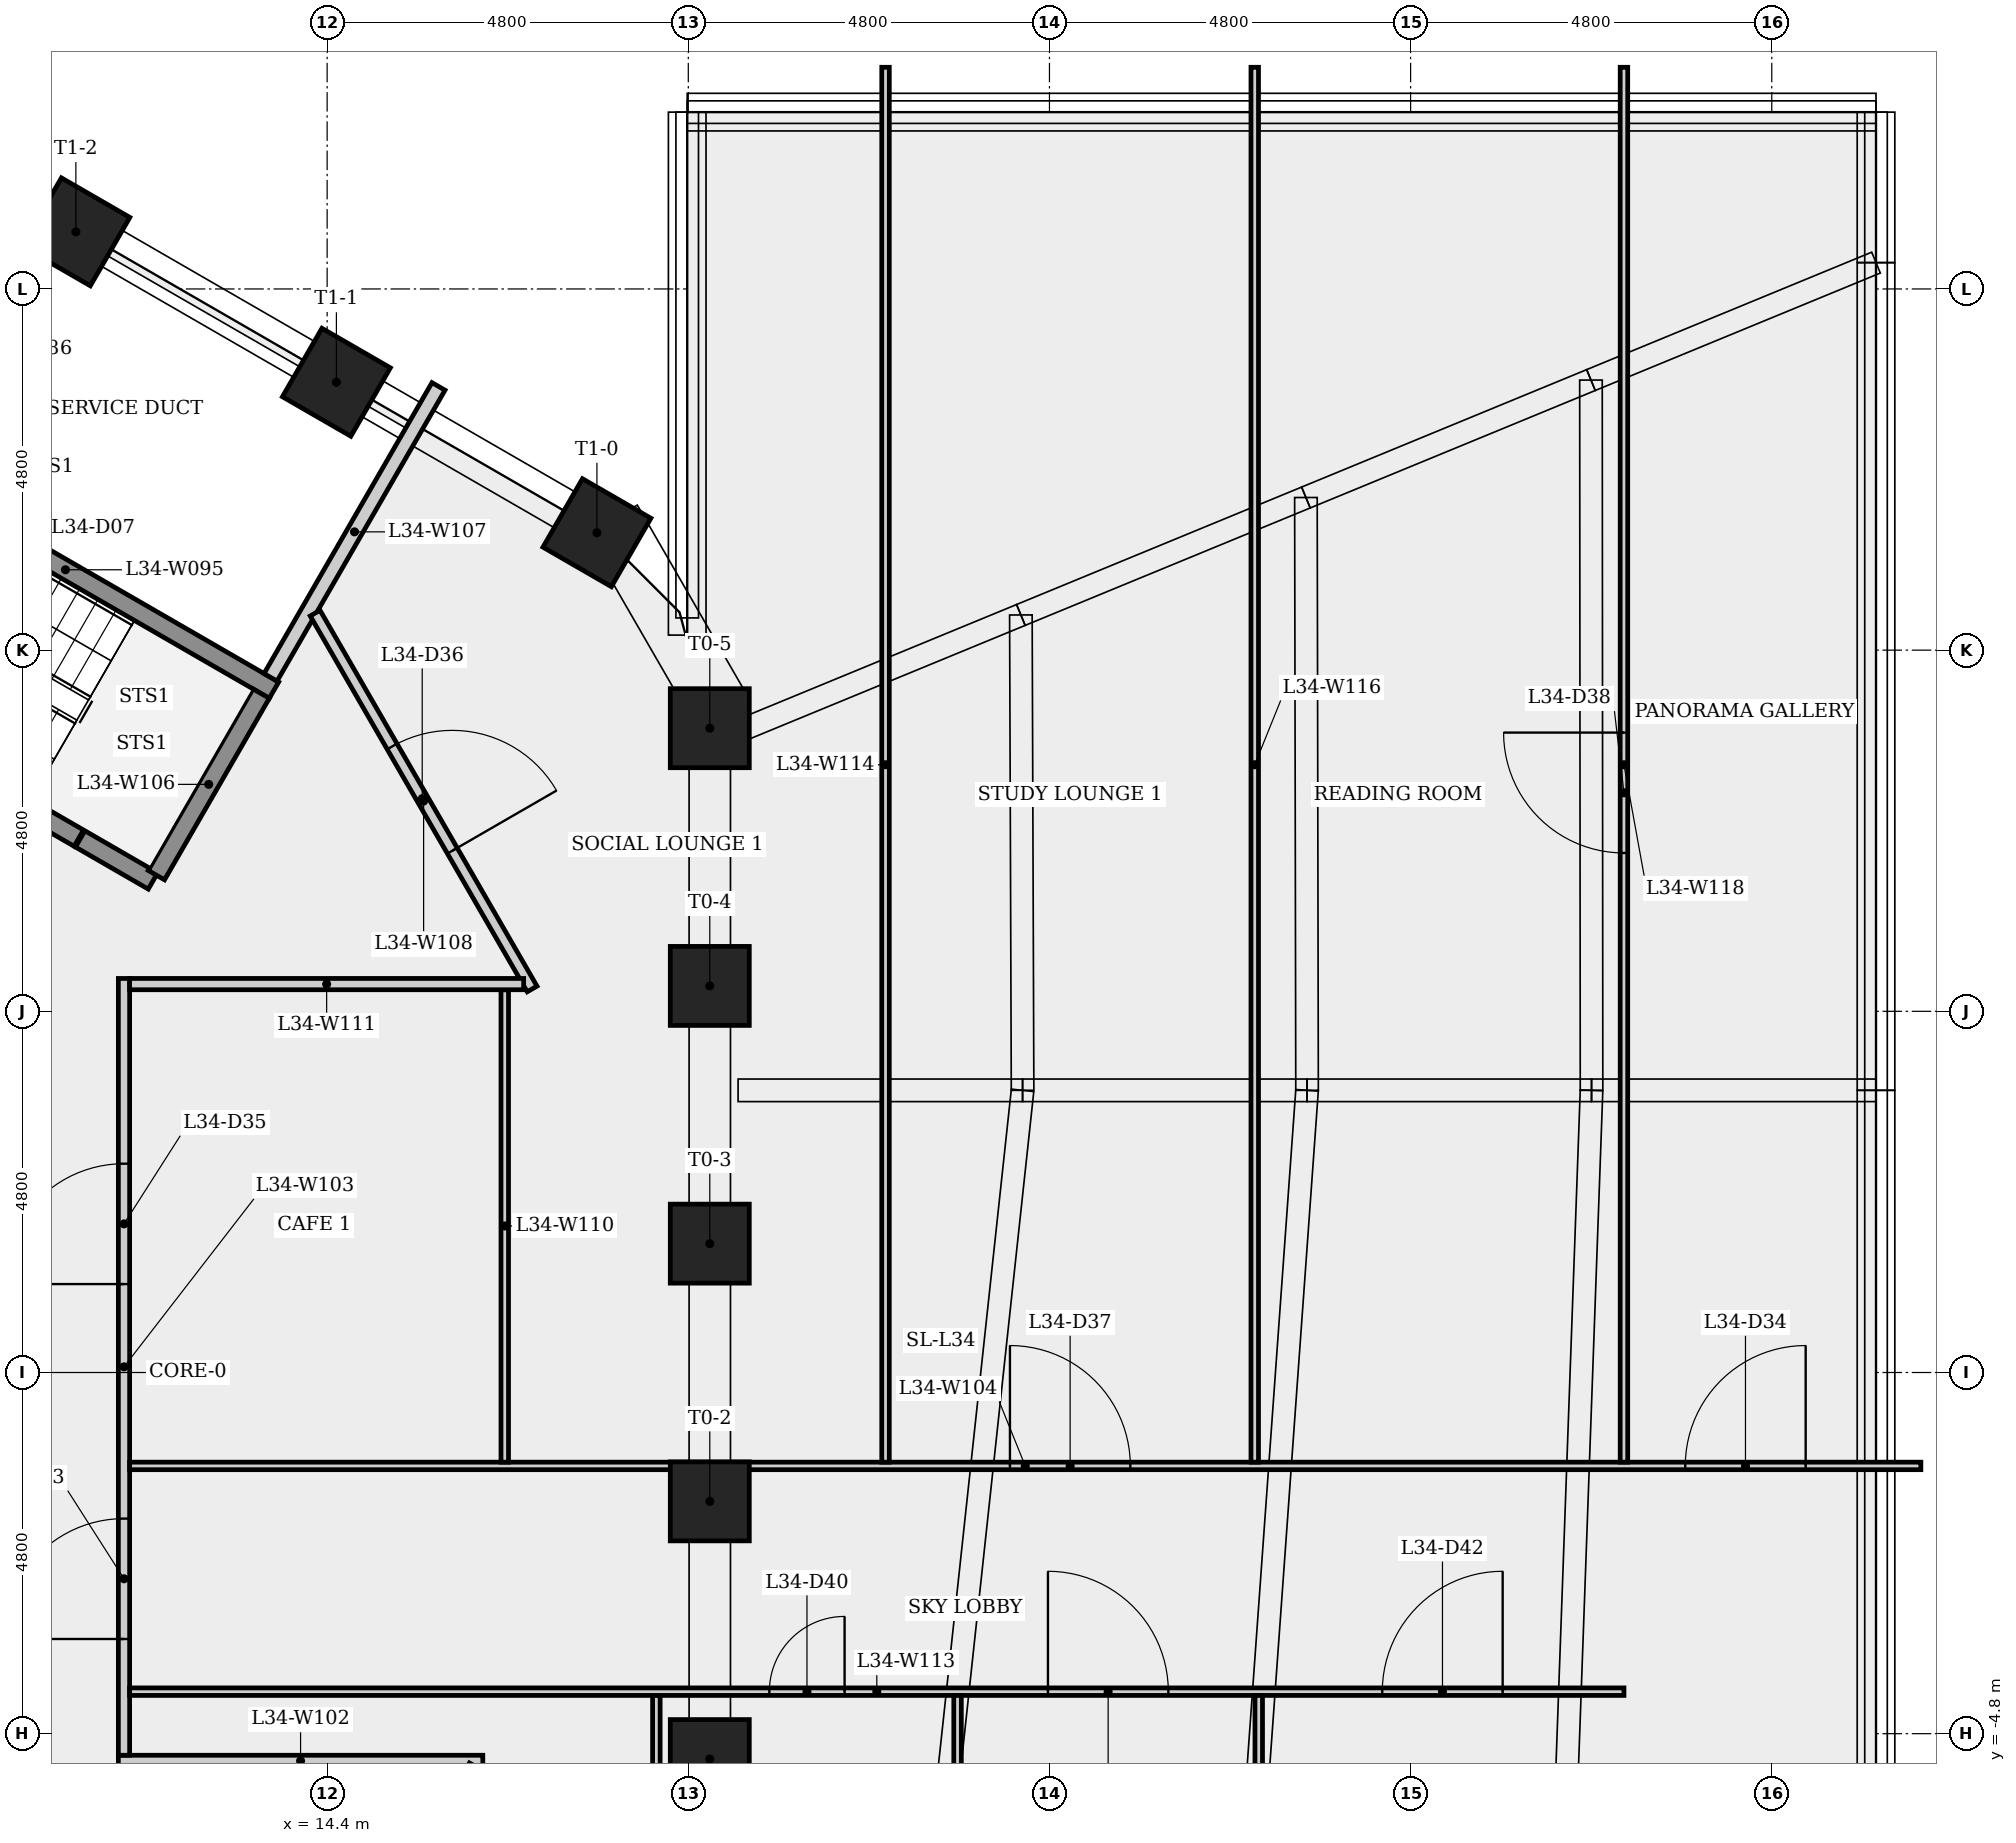
"""IFC4 building model, lengths in metres.
Left out: names, types, materials, properties, quantities, classifications, styles, units other than length and angle.
Written with IfcOpenShell. Run it as: python <this file> out.ifc"""

import sys

from ifc_helpers import new_model, si_unit, direction, frame, frame_2d, origin, origin_2d, place, context, subcontext, project, spatial, rectangle, extrude, element, fill, save


model = new_model("IFC4")
c1 = context("Model", 3, precision=1e-05, world=origin(), true_north=direction((0.0, 1.0)))
c2 = subcontext(c1, "Body", "Model", "MODEL_VIEW")
j1 = project(units=[si_unit("LENGTHUNIT", "METRE"), si_unit("PLANEANGLEUNIT", "RADIAN")], contexts=[c1])
p1 = place(None, origin())
s1 = spatial("IfcSite", under=j1, at=p1, CompositionType="ELEMENT")
p2 = place(p1, origin())
s2 = spatial("IfcBuilding", under=s1, at=p2, CompositionType="ELEMENT")
p3 = place(p2, frame((0.0, 0.0, 128.5)))
s3 = spatial("IfcBuildingStorey", under=s2, at=p3, CompositionType="ELEMENT", Elevation=128.5)
for number, where, z_axis, x_axis in (
    (1, (19.486, -5.137, 0.0), (0.0, 0.0, 1.0), (1.0, 0.0, 0.0)),
    (2, (19.486, -1.712, 0.0), (0.0, 0.0, 1.0), (1.0, 0.0, 0.0)),
    (3, (19.486, 1.712, 0.0), (0.0, 0.0, 1.0), (1.0, 0.0, 0.0)),
    (4, (19.486, 5.137, 0.0), (0.0, 0.0, 1.0), (1.0, 0.0, 0.0)),
    (5, (19.486, 8.562, 0.0), (0.0, 0.0, 1.0), (1.0, 0.0, 0.0)),
    (6, (17.986, 11.161, 0.0), (0.0, 0.0, 1.0), (0.5, 0.866, 0.0)),
    (7, (14.523, 13.16, 0.0), (0.0, 0.0, 1.0), (0.5, 0.866, 0.0)),
    (8, (11.06, 15.159, 0.0), (0.0, 0.0, 1.0), (0.5, 0.866, 0.0)),
):
    element("IfcColumn", number, at=place(p3, frame(where, z_axis=z_axis, x_axis=x_axis)), inside=s3, PredefinedType="COLUMN", context=c2, shape_type="SweptSolid", body=[
        extrude(rectangle(XDim=1.05, YDim=1.05, at=origin_2d()), origin(), (0.0, 0.0, 1.0), 4.0),
    ])
p4 = place(p3, frame((8.151, 12.268, 0.0), z_axis=(0.0, 0.0, 1.0), x_axis=(0.866025499775, -0.499999833739, 0.0)))
e9 = element("IfcWall", 9, at=p4, inside=s3, PredefinedType="SHEAR", context=c2, shape_type="SweptSolid", body=[
    extrude(rectangle(XDim=6.4, YDim=0.25, at=frame_2d((3.2, 0.0))), origin(), (0.0, 0.0, 1.0), 3.65),
])
p5 = place(p3, frame((11.1, 7.101, 0.0), z_axis=(0.0, 0.0, 1.0), x_axis=(-0.8660265141, 0.499998076872, 0.0)))
e10 = element("IfcWall", 10, at=p5, inside=s3, PredefinedType="SHEAR", context=c2, shape_type="SweptSolid", body=[
    extrude(rectangle(XDim=5.137, YDim=0.25, at=frame_2d((2.569, 0.0))), origin(), (0.0, 0.0, 1.0), 3.65),
])
p6 = place(p5, frame((3.987, 0.0, 0.0)))
e11 = element("IfcOpeningElement", 11, at=p6, cuts=e10, PredefinedType="OPENING", context=c2, shape_type="SweptSolid", body=[
    extrude(rectangle(XDim=1.0, YDim=2.1, at=frame_2d((0.5, 1.05))), frame((0.0, 0.135, 0.0), z_axis=(0.0, -1.0, 0.0), x_axis=(1.0, 0.0, 0.0)), (0.0, 0.0, 1.0), 0.27),
])
p7 = place(p3, frame((11.625, -5.162, 0.0), z_axis=(0.0, 0.0, 1.0), x_axis=(1.0, 0.0, 0.0)))
e12 = element("IfcWall", 12, at=p7, inside=s3, PredefinedType="PARTITIONING", context=c2, shape_type="SweptSolid", body=[
    extrude(rectangle(XDim=4.844, YDim=0.15, at=frame_2d((2.422, 0.0))), origin(), (0.0, 0.0, 1.0), 3.65),
])
p8 = place(p3, frame((11.7, -5.087, 0.0), z_axis=(0.0, 0.0, 1.0), x_axis=(0.0, 1.0, 0.0)))
e13 = element("IfcWall", 13, at=p8, inside=s3, PredefinedType="PARTITIONING", context=c2, shape_type="SweptSolid", body=[
    extrude(rectangle(XDim=10.323, YDim=0.15, at=frame_2d((5.162, 0.0))), origin(), (0.0, 0.0, 1.0), 3.65),
])
p9 = place(p8, frame((1.545, 0.0, 0.0)))
e14 = element("IfcOpeningElement", 14, at=p9, cuts=e13, PredefinedType="OPENING", context=c2, shape_type="SweptSolid", body=[
    extrude(rectangle(XDim=1.6, YDim=2.1, at=frame_2d((0.8, 1.05))), frame((0.0, 0.085, 0.0), z_axis=(0.0, -1.0, 0.0), x_axis=(1.0, 0.0, 0.0)), (0.0, 0.0, 1.0), 0.17),
])
p10 = place(p8, frame((6.262, 0.0, 0.0)))
e15 = element("IfcOpeningElement", 15, at=p10, cuts=e13, PredefinedType="OPENING", context=c2, shape_type="SweptSolid", body=[
    extrude(rectangle(XDim=1.6, YDim=2.1, at=frame_2d((0.8, 1.05))), frame((0.0, 0.085, 0.0), z_axis=(0.0, -1.0, 0.0), x_axis=(1.0, 0.0, 0.0)), (0.0, 0.0, 1.0), 0.17),
])
p11 = place(p3, frame((11.775, -1.242, 0.0), z_axis=(0.0, 0.0, 1.0), x_axis=(1.0, 0.0, 0.0)))
e16 = element("IfcWall", 16, at=p11, inside=s3, PredefinedType="PARTITIONING", context=c2, shape_type="SweptSolid", body=[
    extrude(rectangle(XDim=23.807, YDim=0.1, at=frame_2d((11.903, 0.0))), origin(), (0.0, 0.0, 1.0), 3.65),
])
p12 = place(p11, frame((20.676, 0.0, 0.0)))
e17 = element("IfcOpeningElement", 17, at=p12, cuts=e16, PredefinedType="OPENING", context=c2, shape_type="SweptSolid", body=[
    extrude(rectangle(XDim=1.6, YDim=2.1, at=frame_2d((0.8, 1.05))), frame((0.0, 0.06, 0.0), z_axis=(0.0, -1.0, 0.0), x_axis=(1.0, 0.0, 0.0)), (0.0, 0.0, 1.0), 0.12),
])
p13 = place(p11, frame((11.7, 0.0, 0.0)))
e18 = element("IfcOpeningElement", 18, at=p13, cuts=e16, PredefinedType="OPENING", context=c2, shape_type="SweptSolid", body=[
    extrude(rectangle(XDim=1.6, YDim=2.1, at=frame_2d((0.8, 1.05))), frame((0.0, 0.06, 0.0), z_axis=(0.0, -1.0, 0.0), x_axis=(1.0, 0.0, 0.0)), (0.0, 0.0, 1.0), 0.12),
])
p14 = place(p3, frame((12.085, 6.532, 0.0), z_axis=(0.0, 0.0, 1.0), x_axis=(-0.86604373436, 0.499968249168, 0.0)))
e19 = element("IfcWall", 19, at=p14, inside=s3, PredefinedType="SHEAR", context=c2, shape_type="SweptSolid", body=[
    extrude(rectangle(XDim=1.118, YDim=0.25, at=frame_2d((0.559, 0.0))), origin(), (0.0, 0.0, 1.0), 3.65),
])
p15 = place(p3, frame((13.523, 9.022, 0.0), z_axis=(0.0, 0.0, 1.0), x_axis=(-0.500013277472, -0.866017737897, 0.0)))
e20 = element("IfcWall", 20, at=p15, inside=s3, PredefinedType="SHEAR", context=c2, shape_type="SweptSolid", body=[
    extrude(rectangle(XDim=2.786, YDim=0.25, at=frame_2d((1.393, 0.0))), origin(), (0.0, 0.0, 1.0), 3.65),
])
p16 = place(p3, frame((13.648, 9.239, 0.0), z_axis=(0.0, 0.0, 1.0), x_axis=(0.499962311098, 0.866047162388, 0.0)))
e21 = element("IfcWall", 21, at=p16, inside=s3, PredefinedType="PLUMBINGWALL", context=c2, shape_type="SweptSolid", body=[
    extrude(rectangle(XDim=4.464, YDim=0.2, at=frame_2d((2.232, 0.0))), origin(), (0.0, 0.0, 1.0), 3.65),
])
p17 = place(p3, frame((14.24, 10.092, 0.0), z_axis=(0.0, 0.0, 1.0), x_axis=(0.500013126474, -0.866017825079, 0.0)))
e22 = element("IfcWall", 22, at=p17, inside=s3, PredefinedType="PARTITIONING", context=c2, shape_type="SweptSolid", body=[
    extrude(rectangle(XDim=5.768, YDim=0.15, at=frame_2d((2.884, 0.0))), origin(), (0.0, 0.0, 1.0), 3.65),
])
p18 = place(p17, frame((2.046, 0.0, 0.0)))
e23 = element("IfcOpeningElement", 23, at=p18, cuts=e22, PredefinedType="OPENING", context=c2, shape_type="SweptSolid", body=[
    extrude(rectangle(XDim=1.6, YDim=2.1, at=frame_2d((0.8, 1.05))), frame((0.0, 0.085, 0.0), z_axis=(0.0, -1.0, 0.0), x_axis=(1.0, 0.0, 0.0)), (0.0, 0.0, 1.0), 0.17),
])
p19 = place(p3, frame((16.356, -5.227, 0.0), z_axis=(0.0, 0.0, 1.0), x_axis=(-0.500017200592, -0.86601547279, 0.0)))
e24 = element("IfcWall", 24, at=p19, inside=s3, PredefinedType="PARTITIONING", context=c2, shape_type="SweptSolid", body=[
    extrude(rectangle(XDim=8.389, YDim=0.15, at=frame_2d((4.194, 0.0))), origin(), (0.0, 0.0, 1.0), 3.65),
])
p20 = place(p19, frame((3.395, 0.0, 0.0)))
e25 = element("IfcOpeningElement", 25, at=p20, cuts=e24, PredefinedType="OPENING", context=c2, shape_type="SweptSolid", body=[
    extrude(rectangle(XDim=1.6, YDim=2.1, at=frame_2d((0.8, 1.05))), frame((0.0, 0.085, 0.0), z_axis=(0.0, -1.0, 0.0), x_axis=(1.0, 0.0, 0.0)), (0.0, 0.0, 1.0), 0.17),
])
p21 = place(p3, frame((16.76, 5.087, 0.0), z_axis=(0.0, 0.0, 1.0), x_axis=(0.0, -1.0, 0.0)))
e26 = element("IfcWall", 26, at=p21, inside=s3, PredefinedType="PARTITIONING", context=c2, shape_type="SweptSolid", body=[
    extrude(rectangle(XDim=6.278, YDim=0.1, at=frame_2d((3.139, 0.0))), origin(), (0.0, 0.0, 1.0), 3.65),
])
p22 = place(p3, frame((11.775, 5.162, 0.0), z_axis=(0.0, 0.0, 1.0), x_axis=(1.0, 0.0, 0.0)))
e27 = element("IfcWall", 27, at=p22, inside=s3, PredefinedType="PARTITIONING", context=c2, shape_type="SweptSolid", body=[
    extrude(rectangle(XDim=5.237, YDim=0.15, at=frame_2d((2.618, 0.0))), origin(), (0.0, 0.0, 1.0), 3.65),
])
p23 = place(p3, frame((18.776, -4.292, 0.0), z_axis=(0.0, 0.0, 1.0), x_axis=(0.0, -1.0, 0.0)))
e28 = element("IfcWall", 28, at=p23, inside=s3, PredefinedType="PARTITIONING", context=c2, shape_type="SweptSolid", body=[
    extrude(rectangle(XDim=5.907, YDim=0.1, at=frame_2d((2.954, 0.0))), origin(), (0.0, 0.0, 1.0), 3.65),
])
p24 = place(p3, frame((11.775, -4.242, 0.0), z_axis=(0.0, 0.0, 1.0), x_axis=(1.0, 0.0, 0.0)))
e29 = element("IfcWall", 29, at=p24, inside=s3, PredefinedType="PARTITIONING", context=c2, shape_type="SweptSolid", body=[
    extrude(rectangle(XDim=19.861, YDim=0.1, at=frame_2d((9.93, 0.0))), origin(), (0.0, 0.0, 1.0), 3.65),
])
p25 = place(p24, frame((8.502, 0.0, 0.0)))
e30 = element("IfcOpeningElement", 30, at=p25, cuts=e29, PredefinedType="OPENING", context=c2, shape_type="SweptSolid", body=[
    extrude(rectangle(XDim=1.0, YDim=2.1, at=frame_2d((0.5, 1.05))), frame((0.0, 0.06, 0.0), z_axis=(0.0, -1.0, 0.0), x_axis=(1.0, 0.0, 0.0)), (0.0, 0.0, 1.0), 0.12),
])
p26 = place(p24, frame((12.205, 0.0, 0.0)))
e31 = element("IfcOpeningElement", 31, at=p26, cuts=e29, PredefinedType="OPENING", context=c2, shape_type="SweptSolid", body=[
    extrude(rectangle(XDim=1.6, YDim=2.1, at=frame_2d((0.8, 1.05))), frame((0.0, 0.06, 0.0), z_axis=(0.0, -1.0, 0.0), x_axis=(1.0, 0.0, 0.0)), (0.0, 0.0, 1.0), 0.12),
])
p27 = place(p24, frame((16.648, 0.0, 0.0)))
e32 = element("IfcOpeningElement", 32, at=p27, cuts=e29, PredefinedType="OPENING", context=c2, shape_type="SweptSolid", body=[
    extrude(rectangle(XDim=1.6, YDim=2.1, at=frame_2d((0.8, 1.05))), frame((0.0, 0.06, 0.0), z_axis=(0.0, -1.0, 0.0), x_axis=(1.0, 0.0, 0.0)), (0.0, 0.0, 1.0), 0.12),
])
p28 = place(p3, frame((21.821, 17.346, 0.0), z_axis=(0.0, 0.0, 1.0), x_axis=(0.0, -1.0, 0.0)))
e33 = element("IfcWall", 33, at=p28, inside=s3, PredefinedType="PARTITIONING", context=c2, shape_type="SweptSolid", body=[
    extrude(rectangle(XDim=18.538, YDim=0.1, at=frame_2d((9.269, 0.0))), origin(), (0.0, 0.0, 1.0), 3.65),
])
p29 = place(p3, frame((22.779, -4.292, 0.0), z_axis=(0.0, 0.0, 1.0), x_axis=(0.0, -1.0, 0.0)))
e34 = element("IfcWall", 34, at=p29, inside=s3, PredefinedType="PARTITIONING", context=c2, shape_type="SweptSolid", body=[
    extrude(rectangle(XDim=17.554, YDim=0.1, at=frame_2d((8.777, 0.0))), origin(), (0.0, 0.0, 1.0), 3.275),
])
p30 = place(p3, frame((26.729, 17.346, 0.0), z_axis=(0.0, 0.0, 1.0), x_axis=(0.0, -1.0, 0.0)))
e35 = element("IfcWall", 35, at=p30, inside=s3, PredefinedType="PARTITIONING", context=c2, shape_type="SweptSolid", body=[
    extrude(rectangle(XDim=18.538, YDim=0.1, at=frame_2d((9.269, 0.0))), origin(), (0.0, 0.0, 1.0), 3.65),
])
p31 = place(p3, frame((26.781, -4.292, 0.0), z_axis=(0.0, 0.0, 1.0), x_axis=(0.0, -1.0, 0.0)))
e36 = element("IfcWall", 36, at=p31, inside=s3, PredefinedType="PARTITIONING", context=c2, shape_type="SweptSolid", body=[
    extrude(rectangle(XDim=17.554, YDim=0.1, at=frame_2d((8.777, 0.0))), origin(), (0.0, 0.0, 1.0), 3.275),
])
p32 = place(p3, frame((31.635, -1.192, 0.0), z_axis=(0.0, 0.0, 1.0), x_axis=(0.0, 1.0, 0.0)))
e37 = element("IfcWall", 37, at=p32, inside=s3, PredefinedType="PARTITIONING", context=c2, shape_type="SweptSolid", body=[
    extrude(rectangle(XDim=18.538, YDim=0.1, at=frame_2d((9.269, 0.0))), origin(), (0.0, 0.0, 1.0), 3.65),
])
p33 = place(p32, frame((8.096, 0.0, 0.0)))
e38 = element("IfcOpeningElement", 38, at=p33, cuts=e37, PredefinedType="OPENING", context=c2, shape_type="SweptSolid", body=[
    extrude(rectangle(XDim=1.6, YDim=2.1, at=frame_2d((0.8, 1.05))), frame((0.0, 0.06, 0.0), z_axis=(0.0, -1.0, 0.0), x_axis=(1.0, 0.0, 0.0)), (0.0, 0.0, 1.0), 0.12),
])
p34 = place(p9, origin())
e39 = element("IfcDoor", 39, at=p34, inside=s3, OperationType="SINGLE_SWING_LEFT", PredefinedType="DOOR", context=c2, shape_type="SweptSolid", body=[
    extrude(rectangle(XDim=1.6, YDim=2.1, at=frame_2d((0.8, 1.05))), frame((0.0, 0.025, 0.0), z_axis=(0.0, -1.0, 0.0), x_axis=(1.0, 0.0, 0.0)), (0.0, 0.0, 1.0), 0.05),
])
fill(e14, e39)
p35 = place(p12, origin())
e40 = element("IfcDoor", 40, at=p35, inside=s3, OperationType="SINGLE_SWING_RIGHT", PredefinedType="DOOR", context=c2, shape_type="SweptSolid", body=[
    extrude(rectangle(XDim=1.6, YDim=2.1, at=frame_2d((0.8, 1.05))), frame((0.0, 0.025, 0.0), z_axis=(0.0, -1.0, 0.0), x_axis=(1.0, 0.0, 0.0)), (0.0, 0.0, 1.0), 0.05),
])
fill(e17, e40)
p36 = place(p10, origin())
e41 = element("IfcDoor", 41, at=p36, inside=s3, OperationType="SINGLE_SWING_LEFT", PredefinedType="DOOR", context=c2, shape_type="SweptSolid", body=[
    extrude(rectangle(XDim=1.6, YDim=2.1, at=frame_2d((0.8, 1.05))), frame((0.0, 0.025, 0.0), z_axis=(0.0, -1.0, 0.0), x_axis=(1.0, 0.0, 0.0)), (0.0, 0.0, 1.0), 0.05),
])
fill(e15, e41)
p37 = place(p18, origin())
e42 = element("IfcDoor", 42, at=p37, inside=s3, OperationType="SINGLE_SWING_RIGHT", PredefinedType="DOOR", context=c2, shape_type="SweptSolid", body=[
    extrude(rectangle(XDim=1.6, YDim=2.1, at=frame_2d((0.8, 1.05))), frame((0.0, 0.025, 0.0), z_axis=(0.0, -1.0, 0.0), x_axis=(1.0, 0.0, 0.0)), (0.0, 0.0, 1.0), 0.05),
])
fill(e23, e42)
p38 = place(p13, origin())
e43 = element("IfcDoor", 43, at=p38, inside=s3, OperationType="SINGLE_SWING_LEFT", PredefinedType="DOOR", context=c2, shape_type="SweptSolid", body=[
    extrude(rectangle(XDim=1.6, YDim=2.1, at=frame_2d((0.8, 1.05))), frame((0.0, 0.025, 0.0), z_axis=(0.0, -1.0, 0.0), x_axis=(1.0, 0.0, 0.0)), (0.0, 0.0, 1.0), 0.05),
])
fill(e18, e43)
p39 = place(p33, origin())
e44 = element("IfcDoor", 44, at=p39, inside=s3, OperationType="SINGLE_SWING_RIGHT", PredefinedType="DOOR", context=c2, shape_type="SweptSolid", body=[
    extrude(rectangle(XDim=1.6, YDim=2.1, at=frame_2d((0.8, 1.05))), frame((0.0, 0.025, 0.0), z_axis=(0.0, -1.0, 0.0), x_axis=(1.0, 0.0, 0.0)), (0.0, 0.0, 1.0), 0.05),
])
fill(e38, e44)
p40 = place(p25, origin())
e45 = element("IfcDoor", 45, at=p40, inside=s3, OperationType="SINGLE_SWING_RIGHT", PredefinedType="DOOR", context=c2, shape_type="SweptSolid", body=[
    extrude(rectangle(XDim=1.0, YDim=2.1, at=frame_2d((0.5, 1.05))), frame((0.0, 0.025, 0.0), z_axis=(0.0, -1.0, 0.0), x_axis=(1.0, 0.0, 0.0)), (0.0, 0.0, 1.0), 0.05),
])
fill(e30, e45)
p41 = place(p26, origin())
e46 = element("IfcDoor", 46, at=p41, inside=s3, OperationType="SINGLE_SWING_LEFT", PredefinedType="DOOR", context=c2, shape_type="SweptSolid", body=[
    extrude(rectangle(XDim=1.6, YDim=2.1, at=frame_2d((0.8, 1.05))), frame((0.0, 0.025, 0.0), z_axis=(0.0, -1.0, 0.0), x_axis=(1.0, 0.0, 0.0)), (0.0, 0.0, 1.0), 0.05),
])
fill(e31, e46)
p42 = place(p27, origin())
e47 = element("IfcDoor", 47, at=p42, inside=s3, OperationType="SINGLE_SWING_RIGHT", PredefinedType="DOOR", context=c2, shape_type="SweptSolid", body=[
    extrude(rectangle(XDim=1.6, YDim=2.1, at=frame_2d((0.8, 1.05))), frame((0.0, 0.025, 0.0), z_axis=(0.0, -1.0, 0.0), x_axis=(1.0, 0.0, 0.0)), (0.0, 0.0, 1.0), 0.05),
])
fill(e32, e47)
save(model, sys.argv[1])
